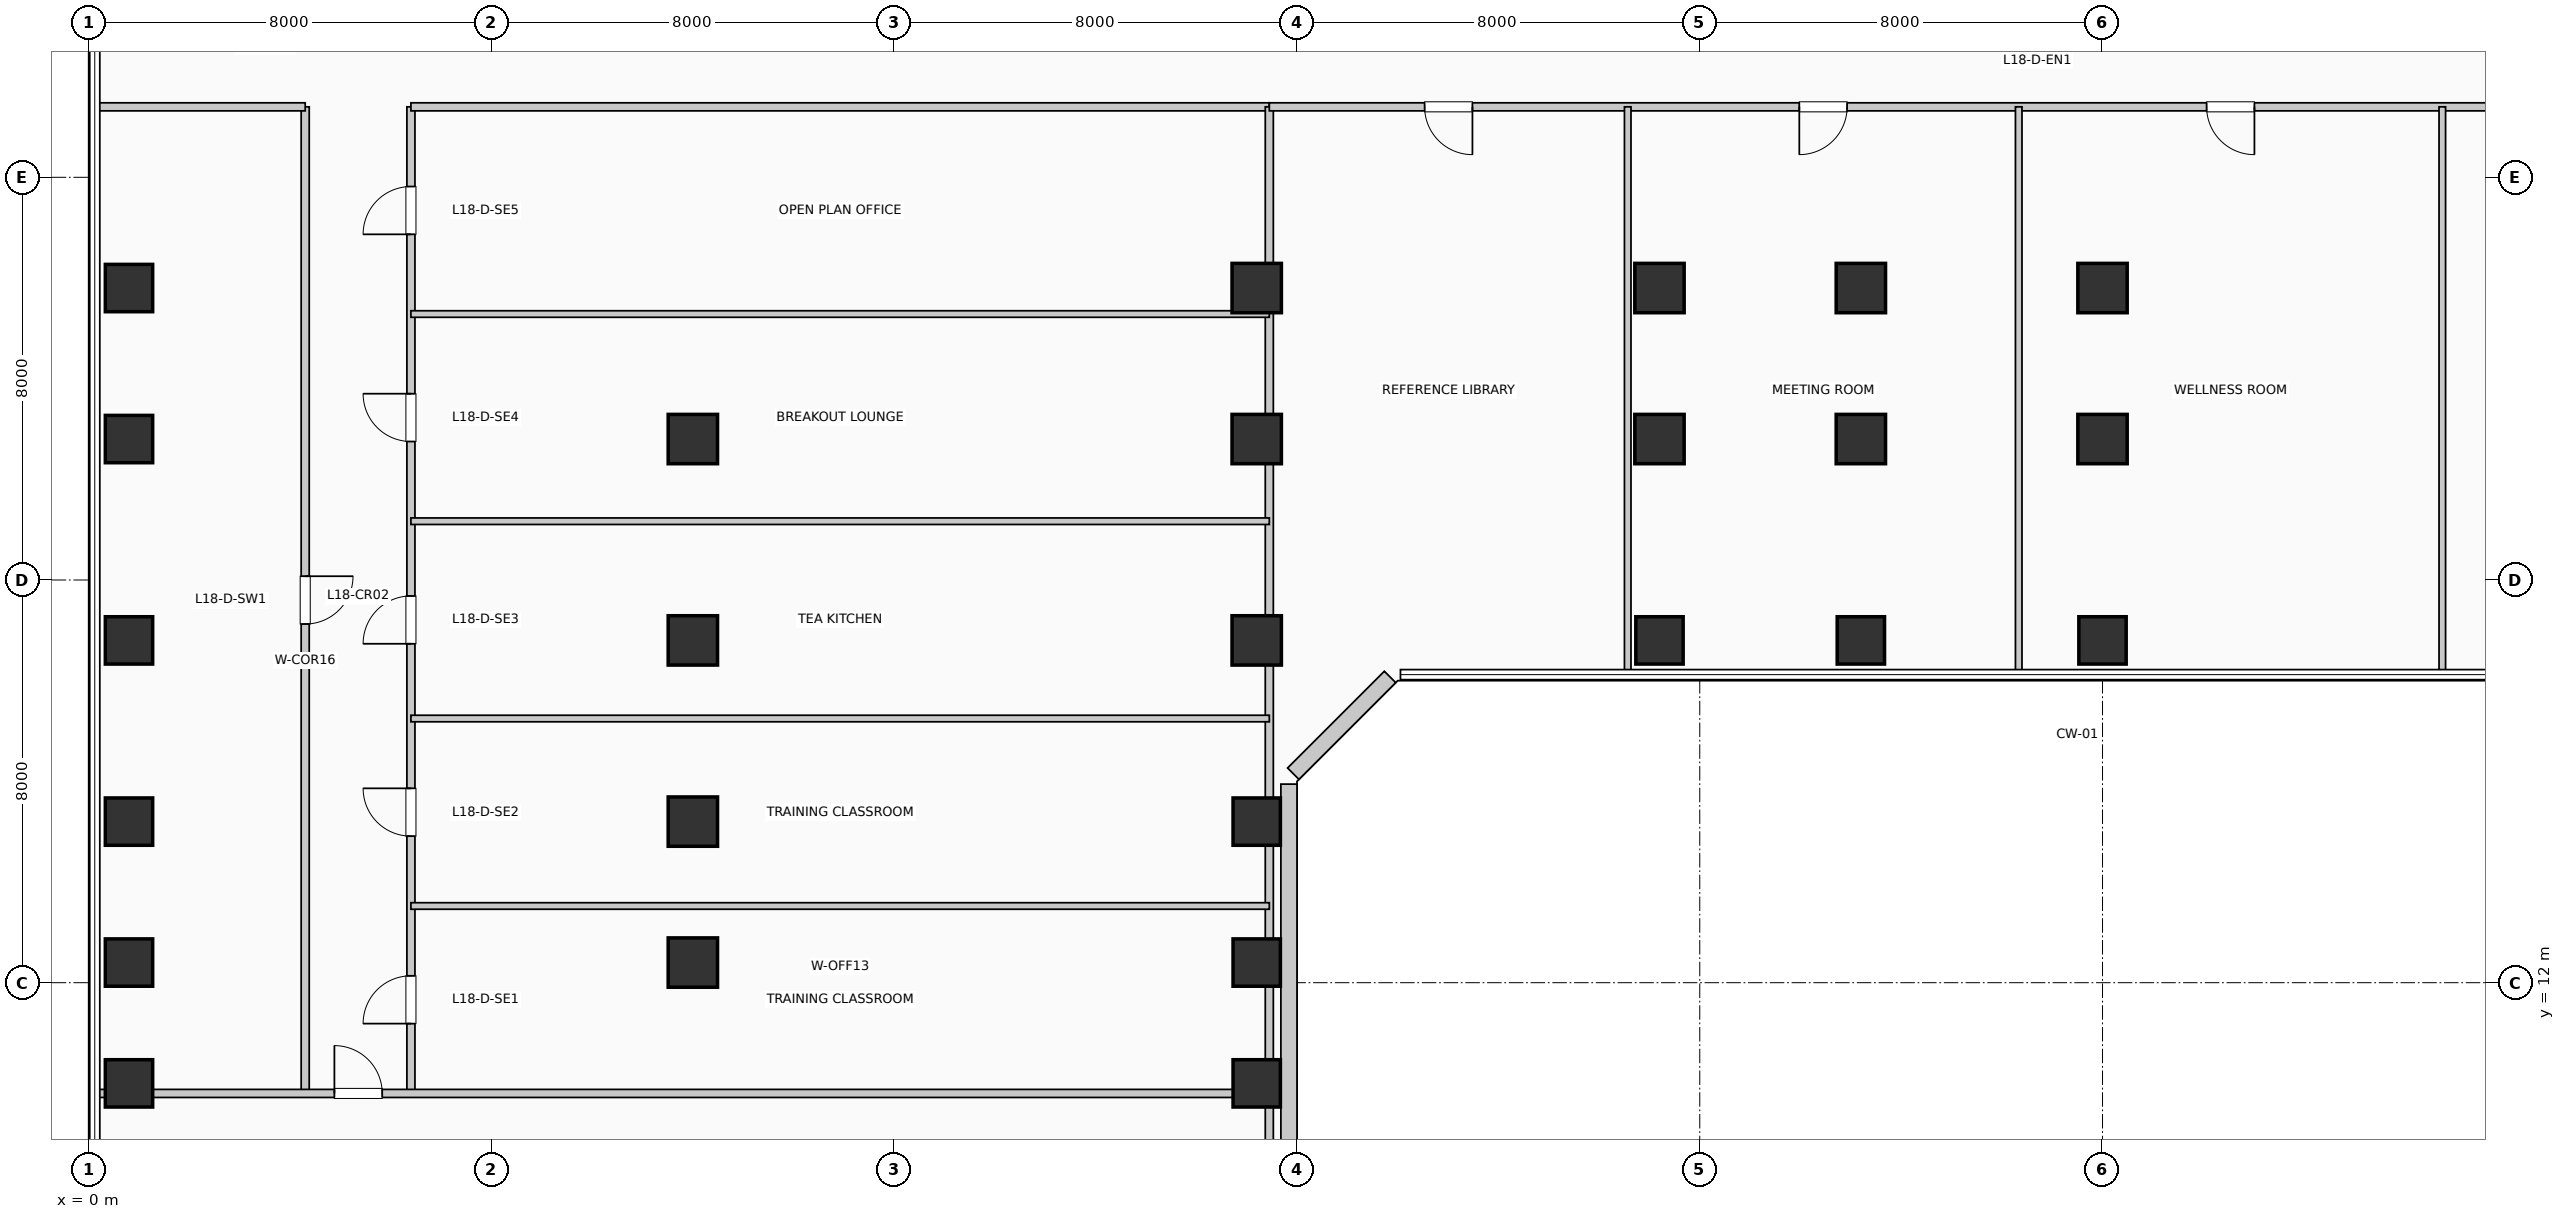
"""IFC4 building model, lengths in metres.
Left out: names, types, materials, properties, quantities, classifications, styles, units other than length and angle.
Written with IfcOpenShell. Run it as: python <this file> out.ifc"""

import sys

from ifc_helpers import new_model, si_unit, direction, frame, frame_2d, origin, origin_2d, place, context, subcontext, project, spatial, rectangle, extrude, element, fill, save


model = new_model("IFC4")
c1 = context("Model", 3, precision=1e-05, world=origin(), true_north=direction((0.0, 1.0)))
c2 = subcontext(c1, "Body", "Model", "MODEL_VIEW")
j1 = project(units=[si_unit("LENGTHUNIT", "METRE"), si_unit("PLANEANGLEUNIT", "RADIAN")], contexts=[c1])
p1 = place(None, origin())
s1 = spatial("IfcSite", under=j1, at=p1, CompositionType="ELEMENT")
p2 = place(p1, origin())
s2 = spatial("IfcBuilding", under=s1, at=p2, CompositionType="ELEMENT")
p3 = place(p2, frame((0.0, 0.0, 77.88)))
s3 = spatial("IfcBuildingStorey", under=s2, at=p3, CompositionType="ELEMENT", Elevation=77.88)
for number, where, z_axis, x_axis in (
    (1, (0.8, 10.0, 0.0), (0.0, 0.0, 1.0), (1.0, 0.0, 0.0)),
    (2, (0.8, 12.4, 0.0), (0.0, 0.0, 1.0), (1.0, 0.0, 0.0)),
    (3, (0.8, 15.2, 0.0), (0.0, 0.0, 1.0), (1.0, 0.0, 0.0)),
    (4, (0.8, 18.8, 0.0), (0.0, 0.0, 1.0), (1.0, 0.0, 0.0)),
    (5, (0.8, 22.8, 0.0), (0.0, 0.0, 1.0), (1.0, 0.0, 0.0)),
    (6, (0.8, 25.8, 0.0), (0.0, 0.0, 1.0), (1.0, 0.0, 0.0)),
):
    element("IfcColumn", number, at=place(p3, frame(where, z_axis=z_axis, x_axis=x_axis)), inside=s3, PredefinedType="COLUMN", context=c2, shape_type="SweptSolid", body=[
        extrude(rectangle(XDim=0.94, YDim=0.94, at=origin_2d()), origin(), (0.0, 0.0, 1.0), 3.96),
    ])
for number, where, z_axis, x_axis in (
    (7, (12.0, 12.4, 0.0), (0.0, 0.0, 1.0), (1.0, 0.0, 0.0)),
    (8, (12.0, 15.2, 0.0), (0.0, 0.0, 1.0), (1.0, 0.0, 0.0)),
    (9, (12.0, 18.8, 0.0), (0.0, 0.0, 1.0), (1.0, 0.0, 0.0)),
    (10, (12.0, 22.8, 0.0), (0.0, 0.0, 1.0), (1.0, 0.0, 0.0)),
):
    element("IfcColumn", number, at=place(p3, frame(where, z_axis=z_axis, x_axis=x_axis)), inside=s3, PredefinedType="COLUMN", context=c2, shape_type="SweptSolid", body=[
        extrude(rectangle(XDim=0.98, YDim=0.98, at=origin_2d()), origin(), (0.0, 0.0, 1.0), 3.96),
    ])
for number, where, z_axis, x_axis in (
    (11, (23.2, 10.0, 0.0), (0.0, 0.0, 1.0), (1.0, 0.0, 0.0)),
    (12, (23.2, 12.4, 0.0), (0.0, 0.0, 1.0), (1.0, 0.0, 0.0)),
    (13, (23.2, 15.2, 0.0), (0.0, 0.0, 1.0), (1.0, 0.0, 0.0)),
):
    element("IfcColumn", number, at=place(p3, frame(where, z_axis=z_axis, x_axis=x_axis)), inside=s3, PredefinedType="COLUMN", context=c2, shape_type="SweptSolid", body=[
        extrude(rectangle(XDim=0.94, YDim=0.94, at=origin_2d()), origin(), (0.0, 0.0, 1.0), 3.96),
    ])
for number, where, z_axis, x_axis in (
    (14, (23.2, 18.8, 0.0), (0.0, 0.0, 1.0), (1.0, 0.0, 0.0)),
    (15, (23.2, 22.8, 0.0), (0.0, 0.0, 1.0), (1.0, 0.0, 0.0)),
    (16, (23.2, 25.8, 0.0), (0.0, 0.0, 1.0), (1.0, 0.0, 0.0)),
):
    element("IfcColumn", number, at=place(p3, frame(where, z_axis=z_axis, x_axis=x_axis)), inside=s3, PredefinedType="COLUMN", context=c2, shape_type="SweptSolid", body=[
        extrude(rectangle(XDim=0.98, YDim=0.98, at=origin_2d()), origin(), (0.0, 0.0, 1.0), 3.96),
    ])
p4 = place(p3, frame((31.2, 18.8, 0.0), z_axis=(0.0, 0.0, 1.0), x_axis=(1.0, 0.0, 0.0)))
e17 = element("IfcColumn", 17, at=p4, inside=s3, PredefinedType="COLUMN", context=c2, shape_type="SweptSolid", body=[
    extrude(rectangle(XDim=0.94, YDim=0.94, at=origin_2d()), origin(), (0.0, 0.0, 1.0), 3.96),
])
for number, where, z_axis, x_axis in (
    (18, (31.2, 22.8, 0.0), (0.0, 0.0, 1.0), (1.0, 0.0, 0.0)),
    (19, (31.2, 25.8, 0.0), (0.0, 0.0, 1.0), (1.0, 0.0, 0.0)),
):
    element("IfcColumn", number, at=place(p3, frame(where, z_axis=z_axis, x_axis=x_axis)), inside=s3, PredefinedType="COLUMN", context=c2, shape_type="SweptSolid", body=[
        extrude(rectangle(XDim=0.98, YDim=0.98, at=origin_2d()), origin(), (0.0, 0.0, 1.0), 3.96),
    ])
p5 = place(p3, frame((35.2, 18.8, 0.0), z_axis=(0.0, 0.0, 1.0), x_axis=(1.0, 0.0, 0.0)))
e20 = element("IfcColumn", 20, at=p5, inside=s3, PredefinedType="COLUMN", context=c2, shape_type="SweptSolid", body=[
    extrude(rectangle(XDim=0.94, YDim=0.94, at=origin_2d()), origin(), (0.0, 0.0, 1.0), 3.96),
])
for number, where, z_axis, x_axis in (
    (21, (35.2, 22.8, 0.0), (0.0, 0.0, 1.0), (1.0, 0.0, 0.0)),
    (22, (35.2, 25.8, 0.0), (0.0, 0.0, 1.0), (1.0, 0.0, 0.0)),
):
    element("IfcColumn", number, at=place(p3, frame(where, z_axis=z_axis, x_axis=x_axis)), inside=s3, PredefinedType="COLUMN", context=c2, shape_type="SweptSolid", body=[
        extrude(rectangle(XDim=0.98, YDim=0.98, at=origin_2d()), origin(), (0.0, 0.0, 1.0), 3.96),
    ])
p6 = place(p3, frame((40.0, 18.8, 0.0), z_axis=(0.0, 0.0, 1.0), x_axis=(1.0, 0.0, 0.0)))
e23 = element("IfcColumn", 23, at=p6, inside=s3, PredefinedType="COLUMN", context=c2, shape_type="SweptSolid", body=[
    extrude(rectangle(XDim=0.94, YDim=0.94, at=origin_2d()), origin(), (0.0, 0.0, 1.0), 3.96),
])
for number, where, z_axis, x_axis in (
    (24, (40.0, 22.8, 0.0), (0.0, 0.0, 1.0), (1.0, 0.0, 0.0)),
    (25, (40.0, 25.8, 0.0), (0.0, 0.0, 1.0), (1.0, 0.0, 0.0)),
):
    element("IfcColumn", number, at=place(p3, frame(where, z_axis=z_axis, x_axis=x_axis)), inside=s3, PredefinedType="COLUMN", context=c2, shape_type="SweptSolid", body=[
        extrude(rectangle(XDim=0.98, YDim=0.98, at=origin_2d()), origin(), (0.0, 0.0, 1.0), 3.96),
    ])
p7 = place(p3, frame((23.84, 3.055, 0.0), z_axis=(0.0, 0.0, 1.0), x_axis=(0.0, 1.0, 0.0)))
e26 = element("IfcWall", 26, at=p7, inside=s3, PredefinedType="SOLIDWALL", context=c2, shape_type="SweptSolid", body=[
    extrude(rectangle(XDim=12.89, YDim=0.32, at=frame_2d((6.445, 0.0))), origin(), (0.0, 0.0, 1.0), 3.71),
])
p8 = place(p3, frame((23.926, 16.152, 0.0), z_axis=(0.0, 0.0, 1.0), x_axis=(0.707106781187, 0.707106781187, 0.0)))
e27 = element("IfcWall", 27, at=p8, inside=s3, PredefinedType="SOLIDWALL", context=c2, shape_type="SweptSolid", body=[
    extrude(rectangle(XDim=2.718, YDim=0.32, at=frame_2d((1.359, 0.0))), origin(), (0.0, 0.0, 1.0), 3.71),
])
p9 = place(p3, frame((4.3, 9.8, 0.0), z_axis=(0.0, 0.0, 1.0), x_axis=(0.0, 1.0, 0.0)))
e28 = element("IfcWall", 28, at=p9, inside=s3, PredefinedType="PARTITIONING", context=c2, shape_type="SweptSolid", body=[
    extrude(rectangle(XDim=19.6, YDim=0.16, at=frame_2d((9.8, 0.0))), origin(), (0.0, 0.0, 1.0), 3.71),
])
p10 = place(p9, frame((10.275, 0.0, 0.0), z_axis=(0.0, 0.0, 1.0), x_axis=(-1.0, 0.0, 0.0)))
e29 = element("IfcOpeningElement", 29, at=p10, cuts=e28, PredefinedType="OPENING", context=c2, shape_type="SweptSolid", body=[
    extrude(rectangle(XDim=0.95, YDim=2.15, at=frame_2d((0.475, 1.075))), frame((0.0, 0.09, 0.0), z_axis=(0.0, -1.0, 0.0), x_axis=(1.0, 0.0, 0.0)), (0.0, 0.0, 1.0), 0.18),
])
p11 = place(p3, frame((6.4, 9.8, 0.0), z_axis=(0.0, 0.0, 1.0), x_axis=(0.0, 1.0, 0.0)))
e30 = element("IfcWall", 30, at=p11, inside=s3, PredefinedType="PARTITIONING", context=c2, shape_type="SweptSolid", body=[
    extrude(rectangle(XDim=19.6, YDim=0.16, at=frame_2d((9.8, 0.0))), origin(), (0.0, 0.0, 1.0), 3.71),
])
p12 = place(p11, frame((1.387, 0.0, 0.0)))
e31 = element("IfcOpeningElement", 31, at=p12, cuts=e30, PredefinedType="OPENING", context=c2, shape_type="SweptSolid", body=[
    extrude(rectangle(XDim=0.95, YDim=2.15, at=frame_2d((0.475, 1.075))), frame((0.0, 0.09, 0.0), z_axis=(0.0, -1.0, 0.0), x_axis=(1.0, 0.0, 0.0)), (0.0, 0.0, 1.0), 0.18),
])
p13 = place(p11, frame((5.111, 0.0, 0.0)))
e32 = element("IfcOpeningElement", 32, at=p13, cuts=e30, PredefinedType="OPENING", context=c2, shape_type="SweptSolid", body=[
    extrude(rectangle(XDim=0.95, YDim=2.15, at=frame_2d((0.475, 1.075))), frame((0.0, 0.09, 0.0), z_axis=(0.0, -1.0, 0.0), x_axis=(1.0, 0.0, 0.0)), (0.0, 0.0, 1.0), 0.18),
])
p14 = place(p11, frame((8.933, 0.0, 0.0)))
e33 = element("IfcOpeningElement", 33, at=p14, cuts=e30, PredefinedType="OPENING", context=c2, shape_type="SweptSolid", body=[
    extrude(rectangle(XDim=0.95, YDim=2.15, at=frame_2d((0.475, 1.075))), frame((0.0, 0.09, 0.0), z_axis=(0.0, -1.0, 0.0), x_axis=(1.0, 0.0, 0.0)), (0.0, 0.0, 1.0), 0.18),
])
p15 = place(p11, frame((12.951, 0.0, 0.0)))
e34 = element("IfcOpeningElement", 34, at=p15, cuts=e30, PredefinedType="OPENING", context=c2, shape_type="SweptSolid", body=[
    extrude(rectangle(XDim=0.95, YDim=2.15, at=frame_2d((0.475, 1.075))), frame((0.0, 0.09, 0.0), z_axis=(0.0, -1.0, 0.0), x_axis=(1.0, 0.0, 0.0)), (0.0, 0.0, 1.0), 0.18),
])
p16 = place(p11, frame((17.067, 0.0, 0.0)))
e35 = element("IfcOpeningElement", 35, at=p16, cuts=e30, PredefinedType="OPENING", context=c2, shape_type="SweptSolid", body=[
    extrude(rectangle(XDim=0.95, YDim=2.15, at=frame_2d((0.475, 1.075))), frame((0.0, 0.09, 0.0), z_axis=(0.0, -1.0, 0.0), x_axis=(1.0, 0.0, 0.0)), (0.0, 0.0, 1.0), 0.18),
])
p17 = place(p3, frame((0.19, 9.8, 0.0), z_axis=(0.0, 0.0, 1.0), x_axis=(1.0, 0.0, 0.0)))
e36 = element("IfcWall", 36, at=p17, inside=s3, PredefinedType="PARTITIONING", context=c2, shape_type="SweptSolid", body=[
    extrude(rectangle(XDim=23.26, YDim=0.16, at=frame_2d((11.63, 0.0))), origin(), (0.0, 0.0, 1.0), 2.995),
])
p18 = place(p17, frame((4.69, 0.0, 0.0)))
e37 = element("IfcOpeningElement", 37, at=p18, cuts=e36, PredefinedType="OPENING", context=c2, shape_type="SweptSolid", body=[
    extrude(rectangle(XDim=0.95, YDim=2.15, at=frame_2d((0.475, 1.075))), frame((0.0, 0.09, 0.0), z_axis=(0.0, -1.0, 0.0), x_axis=(1.0, 0.0, 0.0)), (0.0, 0.0, 1.0), 0.18),
])
p19 = place(p3, frame((0.19, 29.4, 0.0), z_axis=(0.0, 0.0, 1.0), x_axis=(1.0, 0.0, 0.0)))
e38 = element("IfcWall", 38, at=p19, inside=s3, PredefinedType="PARTITIONING", context=c2, shape_type="SweptSolid", body=[
    extrude(rectangle(XDim=4.11, YDim=0.16, at=frame_2d((2.055, 0.0))), origin(), (0.0, 0.0, 1.0), 3.365),
])
p20 = place(p3, frame((6.4, 29.4, 0.0), z_axis=(0.0, 0.0, 1.0), x_axis=(1.0, 0.0, 0.0)))
e39 = element("IfcWall", 39, at=p20, inside=s3, PredefinedType="PARTITIONING", context=c2, shape_type="SweptSolid", body=[
    extrude(rectangle(XDim=17.05, YDim=0.16, at=frame_2d((8.525, 0.0))), origin(), (0.0, 0.0, 1.0), 3.365),
])
p21 = place(p3, frame((23.45, 1.04, 0.0), z_axis=(0.0, 0.0, 1.0), x_axis=(0.0, 1.0, 0.0)))
e40 = element("IfcWall", 40, at=p21, inside=s3, PredefinedType="PARTITIONING", context=c2, shape_type="SweptSolid", body=[
    extrude(rectangle(XDim=28.36, YDim=0.16, at=frame_2d((14.18, 0.0))), origin(), (0.0, 0.0, 1.0), 2.995),
])
for number, where, z_axis, x_axis in (
    (41, (6.4, 13.524, 0.0), (0.0, 0.0, 1.0), (1.0, 0.0, 0.0)),
    (42, (6.4, 17.248, 0.0), (0.0, 0.0, 1.0), (1.0, 0.0, 0.0)),
    (43, (6.4, 21.168, 0.0), (0.0, 0.0, 1.0), (1.0, 0.0, 0.0)),
    (44, (6.4, 25.284, 0.0), (0.0, 0.0, 1.0), (1.0, 0.0, 0.0)),
):
    element("IfcWall", number, at=place(p3, frame(where, z_axis=z_axis, x_axis=x_axis)), inside=s3, PredefinedType="PARTITIONING", context=c2, shape_type="SweptSolid", body=[
        extrude(rectangle(XDim=17.05, YDim=0.13, at=frame_2d((8.525, 0.0))), origin(), (0.0, 0.0, 1.0), 3.71),
    ])
p22 = place(p3, frame((23.45, 29.4, 0.0), z_axis=(0.0, 0.0, 1.0), x_axis=(1.0, 0.0, 0.0)))
e45 = element("IfcWall", 45, at=p22, inside=s3, PredefinedType="PARTITIONING", context=c2, shape_type="SweptSolid", body=[
    extrude(rectangle(XDim=32.36, YDim=0.16, at=frame_2d((16.18, 0.0))), origin(), (0.0, 0.0, 1.0), 3.365),
])
p23 = place(p22, frame((4.035, 0.0, 0.0), z_axis=(0.0, 0.0, 1.0), x_axis=(-1.0, 0.0, 0.0)))
e46 = element("IfcOpeningElement", 46, at=p23, cuts=e45, PredefinedType="OPENING", context=c2, shape_type="SweptSolid", body=[
    extrude(rectangle(XDim=0.95, YDim=2.15, at=frame_2d((0.475, 1.075))), frame((0.0, 0.09, 0.0), z_axis=(0.0, -1.0, 0.0), x_axis=(1.0, 0.0, 0.0)), (0.0, 0.0, 1.0), 0.18),
])
p24 = place(p22, frame((11.477, 0.0, 0.0), z_axis=(0.0, 0.0, 1.0), x_axis=(-1.0, 0.0, 0.0)))
e47 = element("IfcOpeningElement", 47, at=p24, cuts=e45, PredefinedType="OPENING", context=c2, shape_type="SweptSolid", body=[
    extrude(rectangle(XDim=0.95, YDim=2.15, at=frame_2d((0.475, 1.075))), frame((0.0, 0.09, 0.0), z_axis=(0.0, -1.0, 0.0), x_axis=(1.0, 0.0, 0.0)), (0.0, 0.0, 1.0), 0.18),
])
p25 = place(p22, frame((19.567, 0.0, 0.0), z_axis=(0.0, 0.0, 1.0), x_axis=(-1.0, 0.0, 0.0)))
e48 = element("IfcOpeningElement", 48, at=p25, cuts=e45, PredefinedType="OPENING", context=c2, shape_type="SweptSolid", body=[
    extrude(rectangle(XDim=0.95, YDim=2.15, at=frame_2d((0.475, 1.075))), frame((0.0, 0.09, 0.0), z_axis=(0.0, -1.0, 0.0), x_axis=(1.0, 0.0, 0.0)), (0.0, 0.0, 1.0), 0.18),
])
p26 = place(p22, frame((28.304, 0.0, 0.0), z_axis=(0.0, 0.0, 1.0), x_axis=(-1.0, 0.0, 0.0)))
e49 = element("IfcOpeningElement", 49, at=p26, cuts=e45, PredefinedType="OPENING", context=c2, shape_type="SweptSolid", body=[
    extrude(rectangle(XDim=0.95, YDim=2.15, at=frame_2d((0.475, 1.075))), frame((0.0, 0.09, 0.0), z_axis=(0.0, -1.0, 0.0), x_axis=(1.0, 0.0, 0.0)), (0.0, 0.0, 1.0), 0.18),
])
for number, where, z_axis, x_axis in (
    (50, (30.569, 18.19, 0.0), (0.0, 0.0, 1.0), (0.0, 1.0, 0.0)),
    (51, (38.336, 18.19, 0.0), (0.0, 0.0, 1.0), (0.0, 1.0, 0.0)),
    (52, (46.749, 18.19, 0.0), (0.0, 0.0, 1.0), (0.0, 1.0, 0.0)),
):
    element("IfcWall", number, at=place(p3, frame(where, z_axis=z_axis, x_axis=x_axis)), inside=s3, PredefinedType="PARTITIONING", context=c2, shape_type="SweptSolid", body=[
        extrude(rectangle(XDim=11.21, YDim=0.13, at=frame_2d((5.605, 0.0))), origin(), (0.0, 0.0, 1.0), 3.71),
    ])
p27 = place(p18, origin())
e53 = element("IfcDoor", 53, at=p27, inside=s3, OperationType="SINGLE_SWING_LEFT", PredefinedType="DOOR", context=c2, shape_type="SweptSolid", body=[
    extrude(rectangle(XDim=0.95, YDim=2.15, at=frame_2d((0.475, 1.075))), frame((0.0, 0.025, 0.0), z_axis=(0.0, -1.0, 0.0), x_axis=(1.0, 0.0, 0.0)), (0.0, 0.0, 1.0), 0.05),
])
fill(e37, e53)
p28 = place(p10, origin())
e54 = element("IfcDoor", 54, at=p28, inside=s3, OperationType="SINGLE_SWING_RIGHT", PredefinedType="DOOR", context=c2, shape_type="SweptSolid", body=[
    extrude(rectangle(XDim=0.95, YDim=2.15, at=frame_2d((0.475, 1.075))), frame((0.0, 0.025, 0.0), z_axis=(0.0, -1.0, 0.0), x_axis=(1.0, 0.0, 0.0)), (0.0, 0.0, 1.0), 0.05),
])
fill(e29, e54)
p29 = place(p12, origin())
e55 = element("IfcDoor", 55, at=p29, inside=s3, OperationType="SINGLE_SWING_LEFT", PredefinedType="DOOR", context=c2, shape_type="SweptSolid", body=[
    extrude(rectangle(XDim=0.95, YDim=2.15, at=frame_2d((0.475, 1.075))), frame((0.0, 0.025, 0.0), z_axis=(0.0, -1.0, 0.0), x_axis=(1.0, 0.0, 0.0)), (0.0, 0.0, 1.0), 0.05),
])
fill(e31, e55)
p30 = place(p13, origin())
e56 = element("IfcDoor", 56, at=p30, inside=s3, OperationType="SINGLE_SWING_RIGHT", PredefinedType="DOOR", context=c2, shape_type="SweptSolid", body=[
    extrude(rectangle(XDim=0.95, YDim=2.15, at=frame_2d((0.475, 1.075))), frame((0.0, 0.025, 0.0), z_axis=(0.0, -1.0, 0.0), x_axis=(1.0, 0.0, 0.0)), (0.0, 0.0, 1.0), 0.05),
])
fill(e32, e56)
p31 = place(p14, origin())
e57 = element("IfcDoor", 57, at=p31, inside=s3, OperationType="SINGLE_SWING_LEFT", PredefinedType="DOOR", context=c2, shape_type="SweptSolid", body=[
    extrude(rectangle(XDim=0.95, YDim=2.15, at=frame_2d((0.475, 1.075))), frame((0.0, 0.025, 0.0), z_axis=(0.0, -1.0, 0.0), x_axis=(1.0, 0.0, 0.0)), (0.0, 0.0, 1.0), 0.05),
])
fill(e33, e57)
p32 = place(p15, origin())
e58 = element("IfcDoor", 58, at=p32, inside=s3, OperationType="SINGLE_SWING_RIGHT", PredefinedType="DOOR", context=c2, shape_type="SweptSolid", body=[
    extrude(rectangle(XDim=0.95, YDim=2.15, at=frame_2d((0.475, 1.075))), frame((0.0, 0.025, 0.0), z_axis=(0.0, -1.0, 0.0), x_axis=(1.0, 0.0, 0.0)), (0.0, 0.0, 1.0), 0.05),
])
fill(e34, e58)
p33 = place(p16, origin())
e59 = element("IfcDoor", 59, at=p33, inside=s3, OperationType="SINGLE_SWING_LEFT", PredefinedType="DOOR", context=c2, shape_type="SweptSolid", body=[
    extrude(rectangle(XDim=0.95, YDim=2.15, at=frame_2d((0.475, 1.075))), frame((0.0, 0.025, 0.0), z_axis=(0.0, -1.0, 0.0), x_axis=(1.0, 0.0, 0.0)), (0.0, 0.0, 1.0), 0.05),
])
fill(e35, e59)
p34 = place(p23, origin())
e60 = element("IfcDoor", 60, at=p34, inside=s3, OperationType="SINGLE_SWING_RIGHT", PredefinedType="DOOR", context=c2, shape_type="SweptSolid", body=[
    extrude(rectangle(XDim=0.95, YDim=2.15, at=frame_2d((0.475, 1.075))), frame((0.0, 0.025, 0.0), z_axis=(0.0, -1.0, 0.0), x_axis=(1.0, 0.0, 0.0)), (0.0, 0.0, 1.0), 0.05),
])
fill(e46, e60)
p35 = place(p24, origin())
e61 = element("IfcDoor", 61, at=p35, inside=s3, OperationType="SINGLE_SWING_LEFT", PredefinedType="DOOR", context=c2, shape_type="SweptSolid", body=[
    extrude(rectangle(XDim=0.95, YDim=2.15, at=frame_2d((0.475, 1.075))), frame((0.0, 0.025, 0.0), z_axis=(0.0, -1.0, 0.0), x_axis=(1.0, 0.0, 0.0)), (0.0, 0.0, 1.0), 0.05),
])
fill(e47, e61)
p36 = place(p25, origin())
e62 = element("IfcDoor", 62, at=p36, inside=s3, OperationType="SINGLE_SWING_RIGHT", PredefinedType="DOOR", context=c2, shape_type="SweptSolid", body=[
    extrude(rectangle(XDim=0.95, YDim=2.15, at=frame_2d((0.475, 1.075))), frame((0.0, 0.025, 0.0), z_axis=(0.0, -1.0, 0.0), x_axis=(1.0, 0.0, 0.0)), (0.0, 0.0, 1.0), 0.05),
])
fill(e48, e62)
save(model, sys.argv[1])
